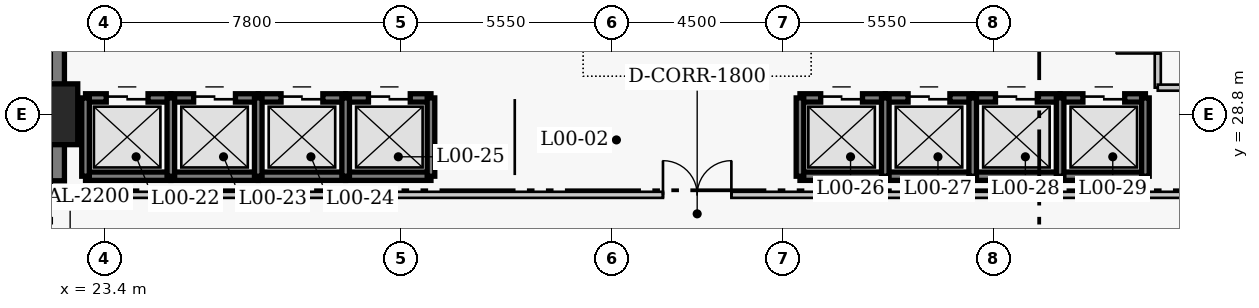
"""IFC4 building model, lengths in metres.
Left out: names, types, materials, properties, quantities, classifications, styles, units other than length and angle.
Written with IfcOpenShell. Run it as: python <this file> out.ifc"""

import sys

from ifc_helpers import new_model, si_unit, direction, frame, frame_2d, origin, origin_2d, place, context, subcontext, project, spatial, rectangle, extrude, element, fill, save


model = new_model("IFC4")
c1 = context("Model", 3, precision=1e-05, world=origin(), true_north=direction((0.0, 1.0)))
c2 = subcontext(c1, "Body", "Model", "MODEL_VIEW")
j1 = project(units=[si_unit("LENGTHUNIT", "METRE"), si_unit("PLANEANGLEUNIT", "RADIAN")], contexts=[c1])
p1 = place(None, origin())
s1 = spatial("IfcSite", under=j1, at=p1, CompositionType="ELEMENT")
p2 = place(p1, origin())
s2 = spatial("IfcBuilding", under=s1, at=p2, CompositionType="ELEMENT")
p3 = place(p2, origin())
s3 = spatial("IfcBuildingStorey", under=s2, at=p3, CompositionType="ELEMENT", Elevation=0.0)
p4 = place(p3, frame((21.9, 27.05, 0.0), z_axis=(0.0, 0.0, 1.0), x_axis=(0.0, 1.0, 0.0)))
e1 = element("IfcWall", 1, at=p4, inside=s3, PredefinedType="SHEAR", context=c2, shape_type="SweptSolid", body=[
    extrude(rectangle(XDim=13.72, YDim=0.9, at=frame_2d((6.86, 0.0))), origin(), (0.0, 0.0, 1.0), 5.4),
])
p5 = place(p3, frame((21.9, 28.8, 0.0), z_axis=(0.0, 0.0, 1.0), x_axis=(1.0, 0.0, 0.0)))
e2 = element("IfcColumn", 2, at=p5, inside=s3, PredefinedType="COLUMN", context=c2, shape_type="SweptSolid", body=[
    extrude(rectangle(XDim=1.6, YDim=1.6, at=origin_2d()), origin(), (0.0, 0.0, 1.0), 5.4),
])
p6 = place(p3, frame((22.905, 29.23, 0.0), z_axis=(0.0, 0.0, 1.0), x_axis=(1.0, 0.0, 0.0)))
e3 = element("IfcWall", 3, at=p6, inside=s3, PredefinedType="SHEAR", context=c2, shape_type="SweptSolid", body=[
    extrude(rectangle(XDim=2.245, YDim=0.22, at=frame_2d((1.123, 0.0))), origin(), (0.0, 0.0, 1.0), 5.4),
])
p7 = place(p6, frame((0.545, 0.0, 0.0)))
e4 = element("IfcOpeningElement", 4, at=p7, cuts=e3, PredefinedType="OPENING", context=c2, shape_type="SweptSolid", body=[
    extrude(rectangle(XDim=1.1, YDim=2.15, at=frame_2d((0.55, 1.075))), frame((0.0, 0.12, 0.0), z_axis=(0.0, -1.0, 0.0), x_axis=(1.0, 0.0, 0.0)), (0.0, 0.0, 1.0), 0.24),
])
p8 = place(p3, frame((22.905, 27.17, 0.0), z_axis=(0.0, 0.0, 1.0), x_axis=(1.0, 0.0, 0.0)))
e5 = element("IfcWall", 5, at=p8, inside=s3, PredefinedType="SHEAR", context=c2, shape_type="SweptSolid", body=[
    extrude(rectangle(XDim=2.245, YDim=0.22, at=frame_2d((1.123, 0.0))), origin(), (0.0, 0.0, 1.0), 5.4),
])
p9 = place(p3, frame((22.905, 27.17, 0.0), z_axis=(0.0, 0.0, 1.0), x_axis=(0.0, 1.0, 0.0)))
e6 = element("IfcWall", 6, at=p9, inside=s3, PredefinedType="SHEAR", context=c2, shape_type="SweptSolid", body=[
    extrude(rectangle(XDim=2.06, YDim=0.2, at=frame_2d((1.03, 0.0))), origin(), (0.0, 0.0, 1.0), 5.4),
])
p10 = place(p3, frame((25.15, 29.23, 0.0), z_axis=(0.0, 0.0, 1.0), x_axis=(1.0, 0.0, 0.0)))
e7 = element("IfcWall", 7, at=p10, inside=s3, PredefinedType="SHEAR", context=c2, shape_type="SweptSolid", body=[
    extrude(rectangle(XDim=2.3, YDim=0.22, at=frame_2d((1.15, 0.0))), origin(), (0.0, 0.0, 1.0), 5.4),
])
p11 = place(p10, frame((0.6, 0.0, 0.0)))
e8 = element("IfcOpeningElement", 8, at=p11, cuts=e7, PredefinedType="OPENING", context=c2, shape_type="SweptSolid", body=[
    extrude(rectangle(XDim=1.1, YDim=2.15, at=frame_2d((0.55, 1.075))), frame((0.0, 0.12, 0.0), z_axis=(0.0, -1.0, 0.0), x_axis=(1.0, 0.0, 0.0)), (0.0, 0.0, 1.0), 0.24),
])
p12 = place(p3, frame((25.15, 27.17, 0.0), z_axis=(0.0, 0.0, 1.0), x_axis=(1.0, 0.0, 0.0)))
e9 = element("IfcWall", 9, at=p12, inside=s3, PredefinedType="SHEAR", context=c2, shape_type="SweptSolid", body=[
    extrude(rectangle(XDim=2.3, YDim=0.22, at=frame_2d((1.15, 0.0))), origin(), (0.0, 0.0, 1.0), 5.4),
])
p13 = place(p3, frame((25.15, 27.17, 0.0), z_axis=(0.0, 0.0, 1.0), x_axis=(0.0, 1.0, 0.0)))
e10 = element("IfcWall", 10, at=p13, inside=s3, PredefinedType="SHEAR", context=c2, shape_type="SweptSolid", body=[
    extrude(rectangle(XDim=2.06, YDim=0.2, at=frame_2d((1.03, 0.0))), origin(), (0.0, 0.0, 1.0), 5.4),
])
p14 = place(p3, frame((27.45, 29.23, 0.0), z_axis=(0.0, 0.0, 1.0), x_axis=(1.0, 0.0, 0.0)))
e11 = element("IfcWall", 11, at=p14, inside=s3, PredefinedType="SHEAR", context=c2, shape_type="SweptSolid", body=[
    extrude(rectangle(XDim=2.3, YDim=0.22, at=frame_2d((1.15, 0.0))), origin(), (0.0, 0.0, 1.0), 5.4),
])
p15 = place(p14, frame((0.6, 0.0, 0.0)))
e12 = element("IfcOpeningElement", 12, at=p15, cuts=e11, PredefinedType="OPENING", context=c2, shape_type="SweptSolid", body=[
    extrude(rectangle(XDim=1.1, YDim=2.15, at=frame_2d((0.55, 1.075))), frame((0.0, 0.12, 0.0), z_axis=(0.0, -1.0, 0.0), x_axis=(1.0, 0.0, 0.0)), (0.0, 0.0, 1.0), 0.24),
])
p16 = place(p3, frame((27.45, 27.17, 0.0), z_axis=(0.0, 0.0, 1.0), x_axis=(1.0, 0.0, 0.0)))
e13 = element("IfcWall", 13, at=p16, inside=s3, PredefinedType="SHEAR", context=c2, shape_type="SweptSolid", body=[
    extrude(rectangle(XDim=2.3, YDim=0.22, at=frame_2d((1.15, 0.0))), origin(), (0.0, 0.0, 1.0), 5.4),
])
p17 = place(p3, frame((27.45, 27.17, 0.0), z_axis=(0.0, 0.0, 1.0), x_axis=(0.0, 1.0, 0.0)))
e14 = element("IfcWall", 14, at=p17, inside=s3, PredefinedType="SHEAR", context=c2, shape_type="SweptSolid", body=[
    extrude(rectangle(XDim=2.06, YDim=0.2, at=frame_2d((1.03, 0.0))), origin(), (0.0, 0.0, 1.0), 5.4),
])
p18 = place(p3, frame((29.75, 29.23, 0.0), z_axis=(0.0, 0.0, 1.0), x_axis=(1.0, 0.0, 0.0)))
e15 = element("IfcWall", 15, at=p18, inside=s3, PredefinedType="SHEAR", context=c2, shape_type="SweptSolid", body=[
    extrude(rectangle(XDim=2.245, YDim=0.22, at=frame_2d((1.123, 0.0))), origin(), (0.0, 0.0, 1.0), 5.4),
])
p19 = place(p18, frame((0.6, 0.0, 0.0)))
e16 = element("IfcOpeningElement", 16, at=p19, cuts=e15, PredefinedType="OPENING", context=c2, shape_type="SweptSolid", body=[
    extrude(rectangle(XDim=1.1, YDim=2.15, at=frame_2d((0.55, 1.075))), frame((0.0, 0.12, 0.0), z_axis=(0.0, -1.0, 0.0), x_axis=(1.0, 0.0, 0.0)), (0.0, 0.0, 1.0), 0.24),
])
p20 = place(p3, frame((29.75, 27.17, 0.0), z_axis=(0.0, 0.0, 1.0), x_axis=(1.0, 0.0, 0.0)))
e17 = element("IfcWall", 17, at=p20, inside=s3, PredefinedType="SHEAR", context=c2, shape_type="SweptSolid", body=[
    extrude(rectangle(XDim=2.245, YDim=0.22, at=frame_2d((1.123, 0.0))), origin(), (0.0, 0.0, 1.0), 5.4),
])
for number, where, z_axis, x_axis in (
    (18, (29.75, 27.17, 0.0), (0.0, 0.0, 1.0), (0.0, 1.0, 0.0)),
    (19, (31.995, 27.17, 0.0), (0.0, 0.0, 1.0), (0.0, 1.0, 0.0)),
):
    element("IfcWall", number, at=place(p3, frame(where, z_axis=z_axis, x_axis=x_axis)), inside=s3, PredefinedType="SHEAR", context=c2, shape_type="SweptSolid", body=[
        extrude(rectangle(XDim=2.06, YDim=0.2, at=frame_2d((1.03, 0.0))), origin(), (0.0, 0.0, 1.0), 5.4),
    ])
p21 = place(p3, frame((41.705, 29.23, 0.0), z_axis=(0.0, 0.0, 1.0), x_axis=(1.0, 0.0, 0.0)))
e20 = element("IfcWall", 20, at=p21, inside=s3, PredefinedType="SHEAR", context=c2, shape_type="SweptSolid", body=[
    extrude(rectangle(XDim=2.245, YDim=0.22, at=frame_2d((1.123, 0.0))), origin(), (0.0, 0.0, 1.0), 5.4),
])
p22 = place(p21, frame((0.545, 0.0, 0.0)))
e21 = element("IfcOpeningElement", 21, at=p22, cuts=e20, PredefinedType="OPENING", context=c2, shape_type="SweptSolid", body=[
    extrude(rectangle(XDim=1.1, YDim=2.15, at=frame_2d((0.55, 1.075))), frame((0.0, 0.12, 0.0), z_axis=(0.0, -1.0, 0.0), x_axis=(1.0, 0.0, 0.0)), (0.0, 0.0, 1.0), 0.24),
])
p23 = place(p3, frame((41.705, 27.17, 0.0), z_axis=(0.0, 0.0, 1.0), x_axis=(1.0, 0.0, 0.0)))
e22 = element("IfcWall", 22, at=p23, inside=s3, PredefinedType="SHEAR", context=c2, shape_type="SweptSolid", body=[
    extrude(rectangle(XDim=2.245, YDim=0.22, at=frame_2d((1.123, 0.0))), origin(), (0.0, 0.0, 1.0), 5.4),
])
p24 = place(p3, frame((41.705, 27.17, 0.0), z_axis=(0.0, 0.0, 1.0), x_axis=(0.0, 1.0, 0.0)))
e23 = element("IfcWall", 23, at=p24, inside=s3, PredefinedType="SHEAR", context=c2, shape_type="SweptSolid", body=[
    extrude(rectangle(XDim=2.06, YDim=0.2, at=frame_2d((1.03, 0.0))), origin(), (0.0, 0.0, 1.0), 5.4),
])
p25 = place(p3, frame((43.95, 29.23, 0.0), z_axis=(0.0, 0.0, 1.0), x_axis=(1.0, 0.0, 0.0)))
e24 = element("IfcWall", 24, at=p25, inside=s3, PredefinedType="SHEAR", context=c2, shape_type="SweptSolid", body=[
    extrude(rectangle(XDim=2.3, YDim=0.22, at=frame_2d((1.15, 0.0))), origin(), (0.0, 0.0, 1.0), 5.4),
])
p26 = place(p25, frame((0.6, 0.0, 0.0)))
e25 = element("IfcOpeningElement", 25, at=p26, cuts=e24, PredefinedType="OPENING", context=c2, shape_type="SweptSolid", body=[
    extrude(rectangle(XDim=1.1, YDim=2.15, at=frame_2d((0.55, 1.075))), frame((0.0, 0.12, 0.0), z_axis=(0.0, -1.0, 0.0), x_axis=(1.0, 0.0, 0.0)), (0.0, 0.0, 1.0), 0.24),
])
p27 = place(p3, frame((43.95, 27.17, 0.0), z_axis=(0.0, 0.0, 1.0), x_axis=(1.0, 0.0, 0.0)))
e26 = element("IfcWall", 26, at=p27, inside=s3, PredefinedType="SHEAR", context=c2, shape_type="SweptSolid", body=[
    extrude(rectangle(XDim=2.3, YDim=0.22, at=frame_2d((1.15, 0.0))), origin(), (0.0, 0.0, 1.0), 5.4),
])
p28 = place(p3, frame((43.95, 27.17, 0.0), z_axis=(0.0, 0.0, 1.0), x_axis=(0.0, 1.0, 0.0)))
e27 = element("IfcWall", 27, at=p28, inside=s3, PredefinedType="SHEAR", context=c2, shape_type="SweptSolid", body=[
    extrude(rectangle(XDim=2.06, YDim=0.2, at=frame_2d((1.03, 0.0))), origin(), (0.0, 0.0, 1.0), 5.4),
])
p29 = place(p3, frame((46.25, 29.23, 0.0), z_axis=(0.0, 0.0, 1.0), x_axis=(1.0, 0.0, 0.0)))
e28 = element("IfcWall", 28, at=p29, inside=s3, PredefinedType="SHEAR", context=c2, shape_type="SweptSolid", body=[
    extrude(rectangle(XDim=2.3, YDim=0.22, at=frame_2d((1.15, 0.0))), origin(), (0.0, 0.0, 1.0), 5.4),
])
p30 = place(p29, frame((0.6, 0.0, 0.0)))
e29 = element("IfcOpeningElement", 29, at=p30, cuts=e28, PredefinedType="OPENING", context=c2, shape_type="SweptSolid", body=[
    extrude(rectangle(XDim=1.1, YDim=2.15, at=frame_2d((0.55, 1.075))), frame((0.0, 0.12, 0.0), z_axis=(0.0, -1.0, 0.0), x_axis=(1.0, 0.0, 0.0)), (0.0, 0.0, 1.0), 0.24),
])
p31 = place(p3, frame((46.25, 27.17, 0.0), z_axis=(0.0, 0.0, 1.0), x_axis=(1.0, 0.0, 0.0)))
e30 = element("IfcWall", 30, at=p31, inside=s3, PredefinedType="SHEAR", context=c2, shape_type="SweptSolid", body=[
    extrude(rectangle(XDim=2.3, YDim=0.22, at=frame_2d((1.15, 0.0))), origin(), (0.0, 0.0, 1.0), 5.4),
])
p32 = place(p3, frame((46.25, 27.17, 0.0), z_axis=(0.0, 0.0, 1.0), x_axis=(0.0, 1.0, 0.0)))
e31 = element("IfcWall", 31, at=p32, inside=s3, PredefinedType="SHEAR", context=c2, shape_type="SweptSolid", body=[
    extrude(rectangle(XDim=2.06, YDim=0.2, at=frame_2d((1.03, 0.0))), origin(), (0.0, 0.0, 1.0), 5.4),
])
p33 = place(p3, frame((48.55, 29.23, 0.0), z_axis=(0.0, 0.0, 1.0), x_axis=(1.0, 0.0, 0.0)))
e32 = element("IfcWall", 32, at=p33, inside=s3, PredefinedType="SHEAR", context=c2, shape_type="SweptSolid", body=[
    extrude(rectangle(XDim=2.245, YDim=0.22, at=frame_2d((1.123, 0.0))), origin(), (0.0, 0.0, 1.0), 5.4),
])
p34 = place(p33, frame((0.6, 0.0, 0.0)))
e33 = element("IfcOpeningElement", 33, at=p34, cuts=e32, PredefinedType="OPENING", context=c2, shape_type="SweptSolid", body=[
    extrude(rectangle(XDim=1.1, YDim=2.15, at=frame_2d((0.55, 1.075))), frame((0.0, 0.12, 0.0), z_axis=(0.0, -1.0, 0.0), x_axis=(1.0, 0.0, 0.0)), (0.0, 0.0, 1.0), 0.24),
])
p35 = place(p3, frame((48.55, 27.17, 0.0), z_axis=(0.0, 0.0, 1.0), x_axis=(1.0, 0.0, 0.0)))
e34 = element("IfcWall", 34, at=p35, inside=s3, PredefinedType="SHEAR", context=c2, shape_type="SweptSolid", body=[
    extrude(rectangle(XDim=2.245, YDim=0.22, at=frame_2d((1.123, 0.0))), origin(), (0.0, 0.0, 1.0), 5.4),
])
for number, where, z_axis, x_axis in (
    (35, (48.55, 27.17, 0.0), (0.0, 0.0, 1.0), (0.0, 1.0, 0.0)),
    (36, (50.795, 27.17, 0.0), (0.0, 0.0, 1.0), (0.0, 1.0, 0.0)),
):
    element("IfcWall", number, at=place(p3, frame(where, z_axis=z_axis, x_axis=x_axis)), inside=s3, PredefinedType="SHEAR", context=c2, shape_type="SweptSolid", body=[
        extrude(rectangle(XDim=2.06, YDim=0.2, at=frame_2d((1.03, 0.0))), origin(), (0.0, 0.0, 1.0), 5.4),
    ])
p36 = place(p3, frame((51.12, 29.5, 0.0), z_axis=(0.0, 0.0, 1.0), x_axis=(0.0, 1.0, 0.0)))
e37 = element("IfcWall", 37, at=p36, inside=s3, PredefinedType="PARTITIONING", context=c2, shape_type="SweptSolid", body=[
    extrude(rectangle(XDim=3.7, YDim=0.16, at=frame_2d((1.85, 0.0))), origin(), (0.0, 0.0, 1.0), 5.1),
])
p37 = place(p36, frame((0.9, 0.0, 0.0)))
e38 = element("IfcOpeningElement", 38, at=p37, cuts=e37, PredefinedType="OPENING", context=c2, shape_type="SweptSolid", body=[
    extrude(rectangle(XDim=1.1, YDim=2.15, at=frame_2d((0.55, 1.075))), frame((0.0, 0.09, 0.0), z_axis=(0.0, -1.0, 0.0), x_axis=(1.0, 0.0, 0.0)), (0.0, 0.0, 1.0), 0.18),
])
p38 = place(p3, frame((51.12, 29.5, 0.0), z_axis=(0.0, 0.0, 1.0), x_axis=(1.0, 0.0, 0.0)))
e39 = element("IfcWall", 39, at=p38, inside=s3, PredefinedType="PARTITIONING", context=c2, shape_type="SweptSolid", body=[
    extrude(rectangle(XDim=5.63, YDim=0.16, at=frame_2d((2.815, 0.0))), origin(), (0.0, 0.0, 1.0), 5.1),
])
p39 = place(p3, frame((-2.98, 26.68, 0.0), z_axis=(0.0, 0.0, 1.0), x_axis=(1.0, 0.0, 0.0)))
e40 = element("IfcWall", 40, at=p39, inside=s3, PredefinedType="PARTITIONING", context=c2, shape_type="SweptSolid", body=[
    extrude(rectangle(XDim=83.96, YDim=0.16, at=frame_2d((41.98, 0.0))), origin(), (0.0, 0.0, 1.0), 5.1),
])
p40 = place(p39, frame((41.08, 0.0, 0.0)))
e41 = element("IfcOpeningElement", 41, at=p40, cuts=e40, PredefinedType="OPENING", context=c2, shape_type="SweptSolid", body=[
    extrude(rectangle(XDim=1.8, YDim=2.2, at=frame_2d((0.9, 1.1))), frame((0.0, 0.09, 0.0), z_axis=(0.0, -1.0, 0.0), x_axis=(1.0, 0.0, 0.0)), (0.0, 0.0, 1.0), 0.18),
])
p41 = place(p39, frame((21.63, 0.0, 0.0)))
e42 = element("IfcOpeningElement", 42, at=p41, cuts=e40, PredefinedType="OPENING", context=c2, shape_type="SweptSolid", body=[
    extrude(rectangle(XDim=1.1, YDim=2.15, at=frame_2d((0.55, 1.075))), frame((0.0, 0.09, 0.0), z_axis=(0.0, -1.0, 0.0), x_axis=(1.0, 0.0, 0.0)), (0.0, 0.0, 1.0), 0.18),
])
p42 = place(p39, frame((68.03, 0.0, 0.0)))
e43 = element("IfcOpeningElement", 43, at=p42, cuts=e40, PredefinedType="OPENING", context=c2, shape_type="SweptSolid", body=[
    extrude(rectangle(XDim=1.9, YDim=2.25, at=frame_2d((0.95, 1.125))), frame((0.0, 0.09, 0.0), z_axis=(0.0, -1.0, 0.0), x_axis=(1.0, 0.0, 0.0)), (0.0, 0.0, 1.0), 0.18),
])
p43 = place(p7, origin())
e44 = element("IfcDoor", 44, at=p43, inside=s3, OperationType="DOUBLE_DOOR_SLIDING", PredefinedType="DOOR", context=c2, shape_type="SweptSolid", body=[
    extrude(rectangle(XDim=1.1, YDim=2.15, at=frame_2d((0.55, 1.075))), frame((0.0, 0.025, 0.0), z_axis=(0.0, -1.0, 0.0), x_axis=(1.0, 0.0, 0.0)), (0.0, 0.0, 1.0), 0.05),
])
fill(e4, e44)
p44 = place(p11, origin())
e45 = element("IfcDoor", 45, at=p44, inside=s3, OperationType="DOUBLE_DOOR_SLIDING", PredefinedType="DOOR", context=c2, shape_type="SweptSolid", body=[
    extrude(rectangle(XDim=1.1, YDim=2.15, at=frame_2d((0.55, 1.075))), frame((0.0, 0.025, 0.0), z_axis=(0.0, -1.0, 0.0), x_axis=(1.0, 0.0, 0.0)), (0.0, 0.0, 1.0), 0.05),
])
fill(e8, e45)
p45 = place(p15, origin())
e46 = element("IfcDoor", 46, at=p45, inside=s3, OperationType="DOUBLE_DOOR_SLIDING", PredefinedType="DOOR", context=c2, shape_type="SweptSolid", body=[
    extrude(rectangle(XDim=1.1, YDim=2.15, at=frame_2d((0.55, 1.075))), frame((0.0, 0.025, 0.0), z_axis=(0.0, -1.0, 0.0), x_axis=(1.0, 0.0, 0.0)), (0.0, 0.0, 1.0), 0.05),
])
fill(e12, e46)
p46 = place(p19, origin())
e47 = element("IfcDoor", 47, at=p46, inside=s3, OperationType="DOUBLE_DOOR_SLIDING", PredefinedType="DOOR", context=c2, shape_type="SweptSolid", body=[
    extrude(rectangle(XDim=1.1, YDim=2.15, at=frame_2d((0.55, 1.075))), frame((0.0, 0.025, 0.0), z_axis=(0.0, -1.0, 0.0), x_axis=(1.0, 0.0, 0.0)), (0.0, 0.0, 1.0), 0.05),
])
fill(e16, e47)
p47 = place(p22, origin())
e48 = element("IfcDoor", 48, at=p47, inside=s3, OperationType="DOUBLE_DOOR_SLIDING", PredefinedType="DOOR", context=c2, shape_type="SweptSolid", body=[
    extrude(rectangle(XDim=1.1, YDim=2.15, at=frame_2d((0.55, 1.075))), frame((0.0, 0.025, 0.0), z_axis=(0.0, -1.0, 0.0), x_axis=(1.0, 0.0, 0.0)), (0.0, 0.0, 1.0), 0.05),
])
fill(e21, e48)
p48 = place(p26, origin())
e49 = element("IfcDoor", 49, at=p48, inside=s3, OperationType="DOUBLE_DOOR_SLIDING", PredefinedType="DOOR", context=c2, shape_type="SweptSolid", body=[
    extrude(rectangle(XDim=1.1, YDim=2.15, at=frame_2d((0.55, 1.075))), frame((0.0, 0.025, 0.0), z_axis=(0.0, -1.0, 0.0), x_axis=(1.0, 0.0, 0.0)), (0.0, 0.0, 1.0), 0.05),
])
fill(e25, e49)
p49 = place(p30, origin())
e50 = element("IfcDoor", 50, at=p49, inside=s3, OperationType="DOUBLE_DOOR_SLIDING", PredefinedType="DOOR", context=c2, shape_type="SweptSolid", body=[
    extrude(rectangle(XDim=1.1, YDim=2.15, at=frame_2d((0.55, 1.075))), frame((0.0, 0.025, 0.0), z_axis=(0.0, -1.0, 0.0), x_axis=(1.0, 0.0, 0.0)), (0.0, 0.0, 1.0), 0.05),
])
fill(e29, e50)
p50 = place(p34, origin())
e51 = element("IfcDoor", 51, at=p50, inside=s3, OperationType="DOUBLE_DOOR_SLIDING", PredefinedType="DOOR", context=c2, shape_type="SweptSolid", body=[
    extrude(rectangle(XDim=1.1, YDim=2.15, at=frame_2d((0.55, 1.075))), frame((0.0, 0.025, 0.0), z_axis=(0.0, -1.0, 0.0), x_axis=(1.0, 0.0, 0.0)), (0.0, 0.0, 1.0), 0.05),
])
fill(e33, e51)
p51 = place(p37, origin())
e52 = element("IfcDoor", 52, at=p51, inside=s3, OperationType="SINGLE_SWING_LEFT", PredefinedType="DOOR", context=c2, shape_type="SweptSolid", body=[
    extrude(rectangle(XDim=1.1, YDim=2.15, at=frame_2d((0.55, 1.075))), frame((0.0, 0.025, 0.0), z_axis=(0.0, -1.0, 0.0), x_axis=(1.0, 0.0, 0.0)), (0.0, 0.0, 1.0), 0.05),
])
fill(e38, e52)
p52 = place(p40, origin())
e53 = element("IfcDoor", 53, at=p52, inside=s3, OperationType="DOUBLE_DOOR_SINGLE_SWING", PredefinedType="DOOR", context=c2, shape_type="SweptSolid", body=[
    extrude(rectangle(XDim=1.8, YDim=2.2, at=frame_2d((0.9, 1.1))), frame((0.0, 0.025, 0.0), z_axis=(0.0, -1.0, 0.0), x_axis=(1.0, 0.0, 0.0)), (0.0, 0.0, 1.0), 0.05),
])
fill(e41, e53)
save(model, sys.argv[1])
